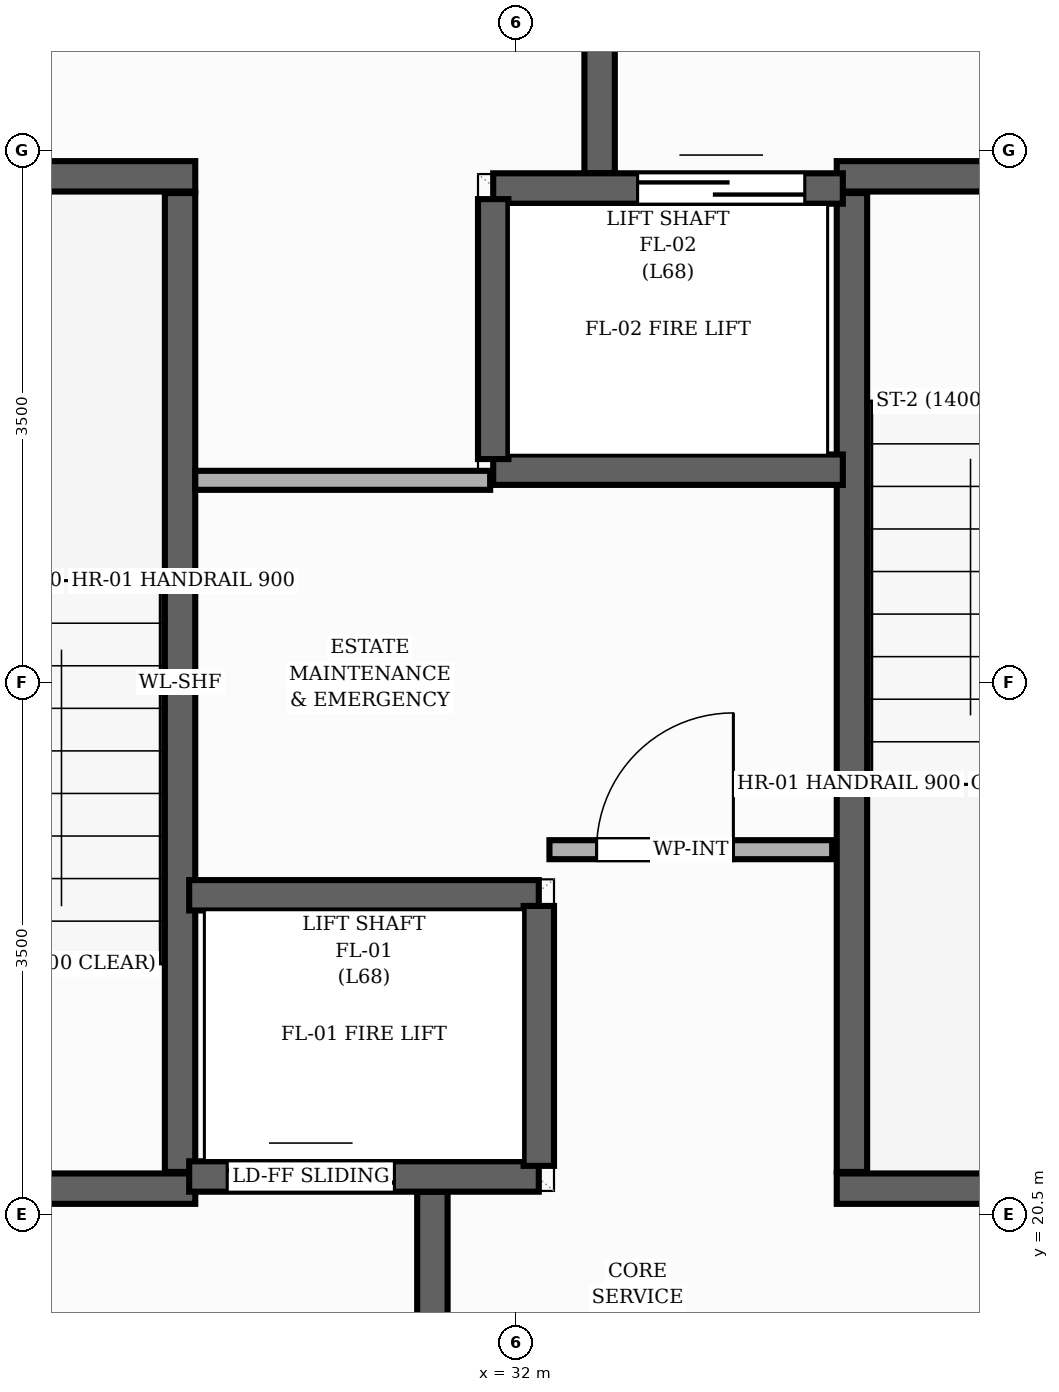
"""IFC4 building model, lengths in metres.
Left out: names, types, materials, properties, quantities, classifications, styles, units other than length and angle.
Written with IfcOpenShell. Run it as: python <this file> out.ifc"""

import sys

from ifc_helpers import new_model, si_unit, direction, frame, frame_2d, origin, place, context, subcontext, project, spatial, rectangle, extrude, element, fill, save


model = new_model("IFC4")
c1 = context("Model", 3, precision=1e-05, world=origin(), true_north=direction((0.0, 1.0)))
c2 = subcontext(c1, "Body", "Model", "MODEL_VIEW")
j1 = project(units=[si_unit("LENGTHUNIT", "METRE"), si_unit("PLANEANGLEUNIT", "RADIAN")], contexts=[c1])
p1 = place(None, origin())
s1 = spatial("IfcSite", under=j1, at=p1, CompositionType="ELEMENT")
p2 = place(p1, origin())
s2 = spatial("IfcBuilding", under=s1, at=p2, CompositionType="ELEMENT")
p3 = place(p2, frame((0.0, 0.0, 227.04)))
s3 = spatial("IfcBuildingStorey", under=s2, at=p3, CompositionType="ELEMENT", Elevation=227.04)
p4 = place(p3, frame((29.79, 20.78, 0.0), z_axis=(0.0, 0.0, 1.0), x_axis=(0.0, 1.0, 0.0)))
e1 = element("IfcWall", 1, at=p4, inside=s3, PredefinedType="SHEAR", context=c2, shape_type="SweptSolid", body=[
    extrude(rectangle(XDim=6.44, YDim=0.2, at=frame_2d((3.22, 0.0))), origin(), (0.0, 0.0, 1.0), 3.2),
])
p5 = place(p3, frame((26.65, 27.33, 0.0), z_axis=(0.0, 0.0, 1.0), x_axis=(1.0, 0.0, 0.0)))
e2 = element("IfcWall", 2, at=p5, inside=s3, PredefinedType="SHEAR", context=c2, shape_type="SweptSolid", body=[
    extrude(rectangle(XDim=3.24, YDim=0.2, at=frame_2d((1.62, 0.0))), origin(), (0.0, 0.0, 1.0), 3.2),
])
p6 = place(p3, frame((26.65, 20.67, 0.0), z_axis=(0.0, 0.0, 1.0), x_axis=(1.0, 0.0, 0.0)))
e3 = element("IfcWall", 3, at=p6, inside=s3, PredefinedType="SHEAR", context=c2, shape_type="SweptSolid", body=[
    extrude(rectangle(XDim=3.24, YDim=0.2, at=frame_2d((1.62, 0.0))), origin(), (0.0, 0.0, 1.0), 3.2),
])
p7 = place(p6, frame((1.055, 0.0, 0.0)))
e4 = element("IfcOpeningElement", 4, at=p7, cuts=e3, PredefinedType="OPENING", context=c2, shape_type="SweptSolid", body=[
    extrude(rectangle(XDim=1.05, YDim=2.15, at=frame_2d((0.525, 1.075))), frame((0.0, 0.11, 0.0), z_axis=(0.0, -1.0, 0.0), x_axis=(1.0, 0.0, 0.0)), (0.0, 0.0, 1.0), 0.22),
])
p8 = place(p3, frame((34.21, 20.78, 0.0), z_axis=(0.0, 0.0, 1.0), x_axis=(0.0, 1.0, 0.0)))
e5 = element("IfcWall", 5, at=p8, inside=s3, PredefinedType="SHEAR", context=c2, shape_type="SweptSolid", body=[
    extrude(rectangle(XDim=6.44, YDim=0.2, at=frame_2d((3.22, 0.0))), origin(), (0.0, 0.0, 1.0), 3.2),
])
p9 = place(p3, frame((34.11, 20.67, 0.0), z_axis=(0.0, 0.0, 1.0), x_axis=(1.0, 0.0, 0.0)))
e6 = element("IfcWall", 6, at=p9, inside=s3, PredefinedType="SHEAR", context=c2, shape_type="SweptSolid", body=[
    extrude(rectangle(XDim=3.24, YDim=0.2, at=frame_2d((1.62, 0.0))), origin(), (0.0, 0.0, 1.0), 3.2),
])
p10 = place(p3, frame((34.11, 27.33, 0.0), z_axis=(0.0, 0.0, 1.0), x_axis=(1.0, 0.0, 0.0)))
e7 = element("IfcWall", 7, at=p10, inside=s3, PredefinedType="SHEAR", context=c2, shape_type="SweptSolid", body=[
    extrude(rectangle(XDim=3.24, YDim=0.2, at=frame_2d((1.62, 0.0))), origin(), (0.0, 0.0, 1.0), 3.2),
])
p11 = place(p10, frame((1.135, 0.0, 0.0)))
e8 = element("IfcOpeningElement", 8, at=p11, cuts=e7, PredefinedType="OPENING", context=c2, shape_type="SweptSolid", body=[
    extrude(rectangle(XDim=1.05, YDim=2.15, at=frame_2d((0.525, 1.075))), frame((0.0, 0.11, 0.0), z_axis=(0.0, -1.0, 0.0), x_axis=(1.0, 0.0, 0.0)), (0.0, 0.0, 1.0), 0.22),
])
for number, where, z_axis, x_axis in (
    (9, (31.45, 17.15, 0.0), (0.0, 0.0, 1.0), (0.0, 1.0, 0.0)),
    (10, (32.55, 27.35, 0.0), (0.0, 0.0, 1.0), (0.0, 1.0, 0.0)),
):
    element("IfcWall", number, at=place(p3, frame(where, z_axis=z_axis, x_axis=x_axis)), inside=s3, PredefinedType="SHEAR", context=c2, shape_type="SweptSolid", body=[
        extrude(rectangle(XDim=3.5, YDim=0.2, at=frame_2d((1.75, 0.0))), origin(), (0.0, 0.0, 1.0), 3.2),
    ])
p12 = place(p3, frame((29.85, 20.75, 0.0), z_axis=(0.0, 0.0, 1.0), x_axis=(1.0, 0.0, 0.0)))
e11 = element("IfcWall", 11, at=p12, inside=s3, PredefinedType="SHEAR", context=c2, shape_type="SweptSolid", body=[
    extrude(rectangle(XDim=2.3, YDim=0.2, at=frame_2d((1.15, 0.0))), origin(), (0.0, 0.0, 1.0), 3.2),
])
p13 = place(p12, frame((0.25, 0.0, 0.0)))
e12 = element("IfcOpeningElement", 12, at=p13, cuts=e11, PredefinedType="OPENING", context=c2, shape_type="SweptSolid", body=[
    extrude(rectangle(XDim=1.1, YDim=2.15, at=frame_2d((0.55, 1.075))), frame((0.0, 0.11, 0.0), z_axis=(0.0, -1.0, 0.0), x_axis=(1.0, 0.0, 0.0)), (0.0, 0.0, 1.0), 0.22),
])
p14 = place(p3, frame((29.85, 22.6, 0.0), z_axis=(0.0, 0.0, 1.0), x_axis=(1.0, 0.0, 0.0)))
e13 = element("IfcWall", 13, at=p14, inside=s3, PredefinedType="SHEAR", context=c2, shape_type="SweptSolid", body=[
    extrude(rectangle(XDim=2.3, YDim=0.2, at=frame_2d((1.15, 0.0))), origin(), (0.0, 0.0, 1.0), 3.2),
])
p15 = place(p3, frame((32.15, 20.82, 0.0), z_axis=(0.0, 0.0, 1.0), x_axis=(0.0, 1.0, 0.0)))
e14 = element("IfcWall", 14, at=p15, inside=s3, PredefinedType="SHEAR", context=c2, shape_type="SweptSolid", body=[
    extrude(rectangle(XDim=1.71, YDim=0.2, at=frame_2d((0.855, 0.0))), origin(), (0.0, 0.0, 1.0), 3.2),
])
p16 = place(p3, frame((31.85, 27.25, 0.0), z_axis=(0.0, 0.0, 1.0), x_axis=(1.0, 0.0, 0.0)))
e15 = element("IfcWall", 15, at=p16, inside=s3, PredefinedType="SHEAR", context=c2, shape_type="SweptSolid", body=[
    extrude(rectangle(XDim=2.3, YDim=0.2, at=frame_2d((1.15, 0.0))), origin(), (0.0, 0.0, 1.0), 3.2),
])
p17 = place(p16, frame((0.95, 0.0, 0.0)))
e16 = element("IfcOpeningElement", 16, at=p17, cuts=e15, PredefinedType="OPENING", context=c2, shape_type="SweptSolid", body=[
    extrude(rectangle(XDim=1.1, YDim=2.15, at=frame_2d((0.55, 1.075))), frame((0.0, 0.11, 0.0), z_axis=(0.0, -1.0, 0.0), x_axis=(1.0, 0.0, 0.0)), (0.0, 0.0, 1.0), 0.22),
])
p18 = place(p3, frame((31.85, 25.4, 0.0), z_axis=(0.0, 0.0, 1.0), x_axis=(1.0, 0.0, 0.0)))
e17 = element("IfcWall", 17, at=p18, inside=s3, PredefinedType="SHEAR", context=c2, shape_type="SweptSolid", body=[
    extrude(rectangle(XDim=2.3, YDim=0.2, at=frame_2d((1.15, 0.0))), origin(), (0.0, 0.0, 1.0), 3.2),
])
p19 = place(p3, frame((31.85, 25.47, 0.0), z_axis=(0.0, 0.0, 1.0), x_axis=(0.0, 1.0, 0.0)))
e18 = element("IfcWall", 18, at=p19, inside=s3, PredefinedType="SHEAR", context=c2, shape_type="SweptSolid", body=[
    extrude(rectangle(XDim=1.71, YDim=0.2, at=frame_2d((0.855, 0.0))), origin(), (0.0, 0.0, 1.0), 3.2),
])
p20 = place(p3, frame((32.22, 22.9, 0.0), z_axis=(0.0, 0.0, 1.0), x_axis=(1.0, 0.0, 0.0)))
e19 = element("IfcWall", 19, at=p20, inside=s3, PredefinedType="PARTITIONING", context=c2, shape_type="SweptSolid", body=[
    extrude(rectangle(XDim=1.86, YDim=0.125, at=frame_2d((0.93, 0.0))), origin(), (0.0, 0.0, 1.0), 2.955),
])
p21 = place(p20, frame((0.31, 0.0, 0.0)))
e20 = element("IfcOpeningElement", 20, at=p21, cuts=e19, PredefinedType="OPENING", context=c2, shape_type="SweptSolid", body=[
    extrude(rectangle(XDim=0.9, YDim=2.1, at=frame_2d((0.45, 1.05))), frame((0.0, 0.073, 0.0), z_axis=(0.0, -1.0, 0.0), x_axis=(1.0, 0.0, 0.0)), (0.0, 0.0, 1.0), 0.145),
])
p22 = place(p3, frame((29.89, 25.33, 0.0), z_axis=(0.0, 0.0, 1.0), x_axis=(1.0, 0.0, 0.0)))
e21 = element("IfcWall", 21, at=p22, inside=s3, PredefinedType="PARTITIONING", context=c2, shape_type="SweptSolid", body=[
    extrude(rectangle(XDim=1.94, YDim=0.125, at=frame_2d((0.97, 0.0))), origin(), (0.0, 0.0, 1.0), 2.955),
])
p23 = place(p13, origin())
e22 = element("IfcDoor", 22, at=p23, inside=s3, OperationType="DOUBLE_DOOR_SLIDING", PredefinedType="DOOR", context=c2, shape_type="SweptSolid", body=[
    extrude(rectangle(XDim=1.1, YDim=2.15, at=frame_2d((0.55, 1.075))), frame((0.0, 0.025, 0.0), z_axis=(0.0, -1.0, 0.0), x_axis=(1.0, 0.0, 0.0)), (0.0, 0.0, 1.0), 0.05),
])
fill(e12, e22)
p24 = place(p17, origin())
e23 = element("IfcDoor", 23, at=p24, inside=s3, OperationType="DOUBLE_DOOR_SLIDING", PredefinedType="DOOR", context=c2, shape_type="SweptSolid", body=[
    extrude(rectangle(XDim=1.1, YDim=2.15, at=frame_2d((0.55, 1.075))), frame((0.0, 0.025, 0.0), z_axis=(0.0, -1.0, 0.0), x_axis=(1.0, 0.0, 0.0)), (0.0, 0.0, 1.0), 0.05),
])
fill(e16, e23)
p25 = place(p21, origin())
e24 = element("IfcDoor", 24, at=p25, inside=s3, OperationType="SINGLE_SWING_RIGHT", PredefinedType="DOOR", context=c2, shape_type="SweptSolid", body=[
    extrude(rectangle(XDim=0.9, YDim=2.1, at=frame_2d((0.45, 1.05))), frame((0.0, 0.025, 0.0), z_axis=(0.0, -1.0, 0.0), x_axis=(1.0, 0.0, 0.0)), (0.0, 0.0, 1.0), 0.05),
])
fill(e20, e24)
save(model, sys.argv[1])
